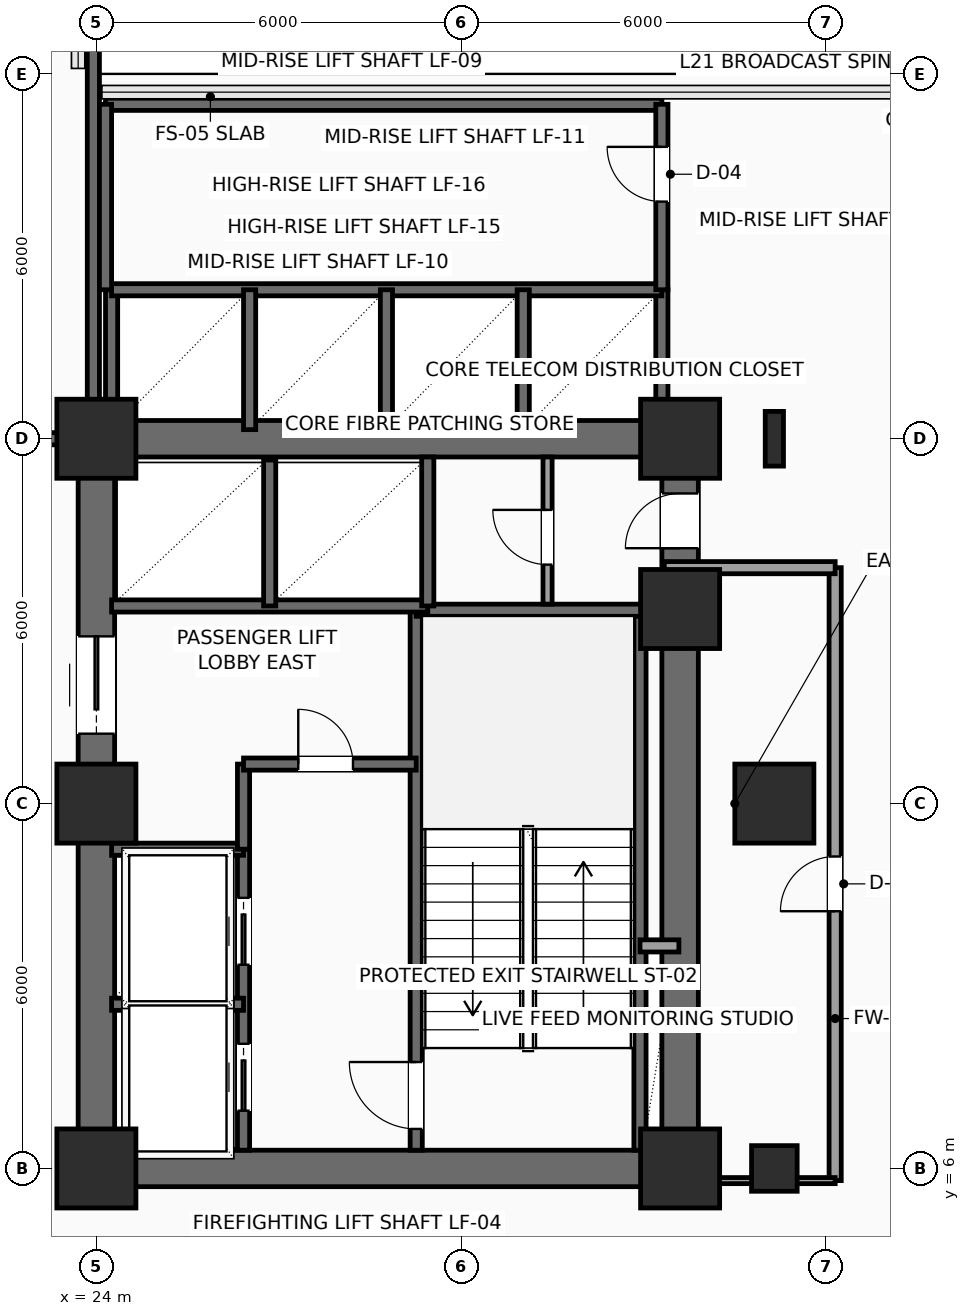
"""IFC4 building model, lengths in metres.
Left out: names, types, materials, properties, quantities, classifications, styles, units other than length and angle.
Written with IfcOpenShell. Run it as: python <this file> out.ifc"""

import sys

from ifc_helpers import new_model, si_unit, direction, frame, frame_2d, origin, origin_2d, place, context, subcontext, project, spatial, rectangle, hollow_rectangle, i_section, extrude, element, fill, save


model = new_model("IFC4")
c1 = context("Model", 3, precision=1e-05, world=origin(), true_north=direction((0.0, 1.0)))
c2 = subcontext(c1, "Body", "Model", "MODEL_VIEW")
j1 = project(units=[si_unit("LENGTHUNIT", "METRE"), si_unit("PLANEANGLEUNIT", "RADIAN")], contexts=[c1])
p1 = place(None, origin())
s1 = spatial("IfcSite", under=j1, at=p1, CompositionType="ELEMENT")
p2 = place(p1, origin())
s2 = spatial("IfcBuilding", under=s1, at=p2, CompositionType="ELEMENT")
p3 = place(p2, frame((0.0, 0.0, 90.9)))
s3 = spatial("IfcBuildingStorey", under=s2, at=p3, CompositionType="ELEMENT", Elevation=90.9)
for number, where, z_axis, x_axis in (
    (1, (24.0, 6.0, 0.0), (0.0, 0.0, 1.0), (1.0, 0.0, 0.0)),
    (2, (24.0, 12.0, 0.0), (0.0, 0.0, 1.0), (1.0, 0.0, 0.0)),
    (3, (24.0, 18.0, 0.0), (0.0, 0.0, 1.0), (1.0, 0.0, 0.0)),
    (4, (33.6, 6.0, 0.0), (0.0, 0.0, 1.0), (1.0, 0.0, 0.0)),
    (5, (33.6, 15.2, 0.0), (0.0, 0.0, 1.0), (1.0, 0.0, 0.0)),
    (6, (33.6, 18.0, 0.0), (0.0, 0.0, 1.0), (1.0, 0.0, 0.0)),
):
    element("IfcColumn", number, at=place(p3, frame(where, z_axis=z_axis, x_axis=x_axis)), inside=s3, PredefinedType="COLUMN", context=c2, shape_type="SweptSolid", body=[
        extrude(rectangle(XDim=1.3, YDim=1.3, at=origin_2d()), origin(), (0.0, 0.0, 1.0), 3.9),
    ])
p4 = place(p3, frame((35.15, 6.0, 0.0), z_axis=(0.0, 0.0, 1.0), x_axis=(1.0, 0.0, 0.0)))
e7 = element("IfcColumn", 7, at=p4, inside=s3, PredefinedType="COLUMN", context=c2, shape_type="SweptSolid", body=[
    extrude(hollow_rectangle(XDim=0.75, YDim=0.75, WallThickness=0.035, InnerFilletRadius=0.035, OuterFilletRadius=0.05, at=origin_2d()), origin(), (0.0, 0.0, 1.0), 3.9),
])
p5 = place(p3, frame((35.15, 12.0, 0.0), z_axis=(0.0, 0.0, 1.0), x_axis=(1.0, 0.0, 0.0)))
e8 = element("IfcColumn", 8, at=p5, inside=s3, PredefinedType="COLUMN", context=c2, shape_type="SweptSolid", body=[
    extrude(rectangle(XDim=1.3, YDim=1.3, at=origin_2d()), origin(), (0.0, 0.0, 1.0), 3.9),
])
p6 = place(p3, frame((35.15, 18.0, 0.0), z_axis=(0.0, 0.0, 1.0), x_axis=(1.0, 0.0, 0.0)))
e9 = element("IfcColumn", 9, at=p6, inside=s3, PredefinedType="COLUMN", context=c2, shape_type="SweptSolid", body=[
    extrude(i_section(OverallWidth=0.3, OverallDepth=0.9, WebThickness=0.019, FlangeThickness=0.035, FilletRadius=0.03, at=origin_2d()), origin(), (0.0, 0.0, 1.0), 3.9),
])
for number, where, z_axis, x_axis in (
    (10, (24.0, 6.0, 0.0), (0.0, 0.0, 1.0), (1.0, 0.0, 0.0)),
    (11, (24.0, 18.0, 0.0), (0.0, 0.0, 1.0), (1.0, 0.0, 0.0)),
):
    element("IfcWall", number, at=place(p3, frame(where, z_axis=z_axis, x_axis=x_axis)), inside=s3, PredefinedType="SHEAR", context=c2, shape_type="SweptSolid", body=[
        extrude(rectangle(XDim=9.6, YDim=0.6, at=frame_2d((4.8, 0.0))), origin(), (0.0, 0.0, 1.0), 3.575),
    ])
p7 = place(p3, frame((24.0, 6.0, 0.0), z_axis=(0.0, 0.0, 1.0), x_axis=(0.0, 1.0, 0.0)))
e12 = element("IfcWall", 12, at=p7, inside=s3, PredefinedType="SHEAR", context=c2, shape_type="SweptSolid", body=[
    extrude(rectangle(XDim=12.0, YDim=0.6, at=frame_2d((6.0, 0.0))), origin(), (0.0, 0.0, 1.0), 3.575),
])
p8 = place(p7, frame((7.15, 0.0, 0.0)))
e13 = element("IfcOpeningElement", 13, at=p8, cuts=e12, PredefinedType="OPENING", context=c2, shape_type="SweptSolid", body=[
    extrude(rectangle(XDim=1.6, YDim=2.3, at=frame_2d((0.8, 1.15))), frame((0.0, 0.31, 0.0), z_axis=(0.0, -1.0, 0.0), x_axis=(1.0, 0.0, 0.0)), (0.0, 0.0, 1.0), 0.62),
])
p9 = place(p3, frame((33.6, 6.0, 0.0), z_axis=(0.0, 0.0, 1.0), x_axis=(0.0, 1.0, 0.0)))
e14 = element("IfcWall", 14, at=p9, inside=s3, PredefinedType="SHEAR", context=c2, shape_type="SweptSolid", body=[
    extrude(rectangle(XDim=12.0, YDim=0.6, at=frame_2d((6.0, 0.0))), origin(), (0.0, 0.0, 1.0), 3.575),
])
p10 = place(p9, frame((10.2, 0.0, 0.0)))
e15 = element("IfcOpeningElement", 15, at=p10, cuts=e14, PredefinedType="OPENING", context=c2, shape_type="SweptSolid", body=[
    extrude(rectangle(XDim=0.9, YDim=2.15, at=frame_2d((0.45, 1.075))), frame((0.0, 0.31, 0.0), z_axis=(0.0, -1.0, 0.0), x_axis=(1.0, 0.0, 0.0)), (0.0, 0.0, 1.0), 0.62),
])
p11 = place(p3, frame((29.26, 6.3, 0.0), z_axis=(0.0, 0.0, 1.0), x_axis=(0.0, 1.0, 0.0)))
e16 = element("IfcWall", 16, at=p11, inside=s3, PredefinedType="SHEAR", context=c2, shape_type="SweptSolid", body=[
    extrude(rectangle(XDim=8.88, YDim=0.2, at=frame_2d((4.44, 0.0))), origin(), (0.0, 0.0, 1.0), 3.575),
])
p12 = place(p11, frame((0.35, 0.0, 0.0)))
e17 = element("IfcOpeningElement", 17, at=p12, cuts=e16, PredefinedType="OPENING", context=c2, shape_type="SweptSolid", body=[
    extrude(rectangle(XDim=1.1, YDim=2.2, at=frame_2d((0.55, 1.1))), frame((0.0, 0.11, 0.0), z_axis=(0.0, -1.0, 0.0), x_axis=(1.0, 0.0, 0.0)), (0.0, 0.0, 1.0), 0.22),
])
p13 = place(p3, frame((32.94, 6.3, 0.0), z_axis=(0.0, 0.0, 1.0), x_axis=(0.0, 1.0, 0.0)))
e18 = element("IfcWall", 18, at=p13, inside=s3, PredefinedType="SHEAR", context=c2, shape_type="SweptSolid", body=[
    extrude(rectangle(XDim=8.88, YDim=0.2, at=frame_2d((4.44, 0.0))), origin(), (0.0, 0.0, 1.0), 3.575),
])
p14 = place(p3, frame((29.26, 15.18, 0.0), z_axis=(0.0, 0.0, 1.0), x_axis=(1.0, 0.0, 0.0)))
e19 = element("IfcWall", 19, at=p14, inside=s3, PredefinedType="SHEAR", context=c2, shape_type="SweptSolid", body=[
    extrude(rectangle(XDim=4.04, YDim=0.2, at=frame_2d((2.02, 0.0))), origin(), (0.0, 0.0, 1.0), 3.575),
])
p15 = place(p3, frame((26.42, 6.3, 0.0), z_axis=(0.0, 0.0, 1.0), x_axis=(0.0, 1.0, 0.0)))
e20 = element("IfcWall", 20, at=p15, inside=s3, PredefinedType="SHEAR", context=c2, shape_type="SweptSolid", body=[
    extrude(rectangle(XDim=4.95, YDim=0.2, at=frame_2d((2.475, 0.0))), origin(), (0.0, 0.0, 1.0), 3.575),
])
p16 = place(p15, frame((0.65, 0.0, 0.0)))
e21 = element("IfcOpeningElement", 21, at=p16, cuts=e20, PredefinedType="OPENING", context=c2, shape_type="SweptSolid", body=[
    extrude(rectangle(XDim=1.1, YDim=2.2, at=frame_2d((0.55, 1.1))), frame((0.0, 0.11, 0.0), z_axis=(0.0, -1.0, 0.0), x_axis=(1.0, 0.0, 0.0)), (0.0, 0.0, 1.0), 0.22),
])
p17 = place(p15, frame((3.05, 0.0, 0.0)))
e22 = element("IfcOpeningElement", 22, at=p17, cuts=e20, PredefinedType="OPENING", context=c2, shape_type="SweptSolid", body=[
    extrude(rectangle(XDim=1.1, YDim=2.2, at=frame_2d((0.55, 1.1))), frame((0.0, 0.11, 0.0), z_axis=(0.0, -1.0, 0.0), x_axis=(1.0, 0.0, 0.0)), (0.0, 0.0, 1.0), 0.22),
])
for number, where, z_axis, x_axis in (
    (23, (24.25, 8.7, 0.0), (0.0, 0.0, 1.0), (1.0, 0.0, 0.0)),
    (24, (24.25, 11.25, 0.0), (0.0, 0.0, 1.0), (1.0, 0.0, 0.0)),
):
    element("IfcWall", number, at=place(p3, frame(where, z_axis=z_axis, x_axis=x_axis)), inside=s3, PredefinedType="SHEAR", context=c2, shape_type="SweptSolid", body=[
        extrude(rectangle(XDim=2.17, YDim=0.2, at=frame_2d((1.085, 0.0))), origin(), (0.0, 0.0, 1.0), 3.575),
    ])
p18 = place(p3, frame((26.42, 11.25, 0.0), z_axis=(0.0, 0.0, 1.0), x_axis=(0.0, 1.0, 0.0)))
e25 = element("IfcWall", 25, at=p18, inside=s3, PredefinedType="SHEAR", context=c2, shape_type="SweptSolid", body=[
    extrude(rectangle(XDim=1.4, YDim=0.2, at=frame_2d((0.7, 0.0))), origin(), (0.0, 0.0, 1.0), 3.575),
])
p19 = place(p3, frame((26.42, 12.65, 0.0), z_axis=(0.0, 0.0, 1.0), x_axis=(1.0, 0.0, 0.0)))
e26 = element("IfcWall", 26, at=p19, inside=s3, PredefinedType="SHEAR", context=c2, shape_type="SweptSolid", body=[
    extrude(rectangle(XDim=2.84, YDim=0.2, at=frame_2d((1.42, 0.0))), origin(), (0.0, 0.0, 1.0), 3.575),
])
p20 = place(p19, frame((0.9, 0.0, 0.0)))
e27 = element("IfcOpeningElement", 27, at=p20, cuts=e26, PredefinedType="OPENING", context=c2, shape_type="SweptSolid", body=[
    extrude(rectangle(XDim=0.9, YDim=2.15, at=frame_2d((0.45, 1.075))), frame((0.0, 0.11, 0.0), z_axis=(0.0, -1.0, 0.0), x_axis=(1.0, 0.0, 0.0)), (0.0, 0.0, 1.0), 0.22),
])
p21 = place(p3, frame((32.94, 9.66, 0.0), z_axis=(0.0, 0.0, 1.0), x_axis=(1.0, 0.0, 0.0)))
e28 = element("IfcWall", 28, at=p21, inside=s3, PredefinedType="SOLIDWALL", context=c2, shape_type="SweptSolid", body=[
    extrude(rectangle(XDim=0.64, YDim=0.2, at=frame_2d((0.32, 0.0))), origin(), (0.0, 0.0, 1.0), 3.575),
])
p22 = place(p3, frame((24.25, 15.25, 0.0), z_axis=(0.0, 0.0, 1.0), x_axis=(1.0, 0.0, 0.0)))
e29 = element("IfcWall", 29, at=p22, inside=s3, PredefinedType="SHEAR", context=c2, shape_type="SweptSolid", body=[
    extrude(rectangle(XDim=5.2, YDim=0.2, at=frame_2d((2.6, 0.0))), origin(), (0.0, 0.0, 1.0), 3.575),
])
p23 = place(p3, frame((26.85, 15.25, 0.0), z_axis=(0.0, 0.0, 1.0), x_axis=(0.0, 1.0, 0.0)))
e30 = element("IfcWall", 30, at=p23, inside=s3, PredefinedType="SHEAR", context=c2, shape_type="SweptSolid", body=[
    extrude(rectangle(XDim=2.4, YDim=0.2, at=frame_2d((1.2, 0.0))), origin(), (0.0, 0.0, 1.0), 3.575),
])
p24 = place(p3, frame((29.45, 15.25, 0.0), z_axis=(0.0, 0.0, 1.0), x_axis=(0.0, 1.0, 0.0)))
e31 = element("IfcWall", 31, at=p24, inside=s3, PredefinedType="SHEAR", context=c2, shape_type="SweptSolid", body=[
    extrude(rectangle(XDim=2.45, YDim=0.2, at=frame_2d((1.225, 0.0))), origin(), (0.0, 0.0, 1.0), 3.575),
])
p25 = place(p3, frame((31.42, 15.28, 0.0), z_axis=(0.0, 0.0, 1.0), x_axis=(0.0, 1.0, 0.0)))
e32 = element("IfcWall", 32, at=p25, inside=s3, PredefinedType="PARTITIONING", context=c2, shape_type="SweptSolid", body=[
    extrude(rectangle(XDim=2.42, YDim=0.15, at=frame_2d((1.21, 0.0))), origin(), (0.0, 0.0, 1.0), 3.575),
])
p26 = place(p25, frame((0.65, 0.0, 0.0)))
e33 = element("IfcOpeningElement", 33, at=p26, cuts=e32, PredefinedType="OPENING", context=c2, shape_type="SweptSolid", body=[
    extrude(rectangle(XDim=0.9, YDim=2.15, at=frame_2d((0.45, 1.075))), frame((0.0, 0.085, 0.0), z_axis=(0.0, -1.0, 0.0), x_axis=(1.0, 0.0, 0.0)), (0.0, 0.0, 1.0), 0.17),
])
p27 = place(p3, frame((20.45, 18.0, 0.0), z_axis=(0.0, 0.0, 1.0), x_axis=(1.0, 0.0, 0.0)))
e34 = element("IfcWall", 34, at=p27, inside=s3, PredefinedType="SHEAR", context=c2, shape_type="SweptSolid", body=[
    extrude(rectangle(XDim=3.5, YDim=0.2, at=frame_2d((1.75, 0.0))), origin(), (0.0, 0.0, 1.0), 3.575),
])
p28 = place(p27, frame((0.95, 0.0, 0.0)))
e35 = element("IfcOpeningElement", 35, at=p28, cuts=e34, PredefinedType="OPENING", context=c2, shape_type="SweptSolid", body=[
    extrude(rectangle(XDim=1.6, YDim=2.3, at=frame_2d((0.8, 1.15))), frame((0.0, 0.11, 0.0), z_axis=(0.0, -1.0, 0.0), x_axis=(1.0, 0.0, 0.0)), (0.0, 0.0, 1.0), 0.22),
])
p29 = place(p3, frame((23.95, 18.0, 0.0), z_axis=(0.0, 0.0, 1.0), x_axis=(0.0, 1.0, 0.0)))
e36 = element("IfcWall", 36, at=p29, inside=s3, PredefinedType="SHEAR", context=c2, shape_type="SweptSolid", body=[
    extrude(rectangle(XDim=9.3, YDim=0.2, at=frame_2d((4.65, 0.0))), origin(), (0.0, 0.0, 1.0), 3.575),
])
for number, where, z_axis, x_axis in (
    (37, (33.3, 18.1, 0.0), (0.0, 0.0, 1.0), (0.0, 1.0, 0.0)),
    (38, (24.25, 18.1, 0.0), (0.0, 0.0, 1.0), (0.0, 1.0, 0.0)),
):
    element("IfcWall", number, at=place(p3, frame(where, z_axis=z_axis, x_axis=x_axis)), inside=s3, PredefinedType="SHEAR", context=c2, shape_type="SweptSolid", body=[
        extrude(rectangle(XDim=2.35, YDim=0.2, at=frame_2d((1.175, 0.0))), origin(), (0.0, 0.0, 1.0), 3.575),
    ])
p30 = place(p3, frame((24.25, 20.45, 0.0), z_axis=(0.0, 0.0, 1.0), x_axis=(1.0, 0.0, 0.0)))
e39 = element("IfcWall", 39, at=p30, inside=s3, PredefinedType="SHEAR", context=c2, shape_type="SweptSolid", body=[
    extrude(rectangle(XDim=9.05, YDim=0.2, at=frame_2d((4.525, 0.0))), origin(), (0.0, 0.0, 1.0), 3.575),
])
for number, where, z_axis, x_axis in (
    (40, (26.52, 18.15, 0.0), (0.0, 0.0, 1.0), (0.0, 1.0, 0.0)),
    (41, (28.77, 18.15, 0.0), (0.0, 0.0, 1.0), (0.0, 1.0, 0.0)),
    (42, (31.02, 18.15, 0.0), (0.0, 0.0, 1.0), (0.0, 1.0, 0.0)),
):
    element("IfcWall", number, at=place(p3, frame(where, z_axis=z_axis, x_axis=x_axis)), inside=s3, PredefinedType="SHEAR", context=c2, shape_type="SweptSolid", body=[
        extrude(rectangle(XDim=2.3, YDim=0.2, at=frame_2d((1.15, 0.0))), origin(), (0.0, 0.0, 1.0), 3.575),
    ])
p31 = place(p3, frame((24.15, 23.5, 0.0), z_axis=(0.0, 0.0, 1.0), x_axis=(1.0, 0.0, 0.0)))
e43 = element("IfcWall", 43, at=p31, inside=s3, PredefinedType="SHEAR", context=c2, shape_type="SweptSolid", body=[
    extrude(rectangle(XDim=9.15, YDim=0.2, at=frame_2d((4.575, 0.0))), origin(), (0.0, 0.0, 1.0), 3.575),
])
p32 = place(p3, frame((33.3, 20.45, 0.0), z_axis=(0.0, 0.0, 1.0), x_axis=(0.0, 1.0, 0.0)))
e44 = element("IfcWall", 44, at=p32, inside=s3, PredefinedType="SHEAR", context=c2, shape_type="SweptSolid", body=[
    extrude(rectangle(XDim=3.05, YDim=0.2, at=frame_2d((1.525, 0.0))), origin(), (0.0, 0.0, 1.0), 3.575),
])
p33 = place(p32, frame((1.45, 0.0, 0.0)))
e45 = element("IfcOpeningElement", 45, at=p33, cuts=e44, PredefinedType="OPENING", context=c2, shape_type="SweptSolid", body=[
    extrude(rectangle(XDim=0.9, YDim=2.15, at=frame_2d((0.45, 1.075))), frame((0.0, 0.11, 0.0), z_axis=(0.0, -1.0, 0.0), x_axis=(1.0, 0.0, 0.0)), (0.0, 0.0, 1.0), 0.22),
])
p34 = place(p3, frame((24.15, 20.45, 0.0), z_axis=(0.0, 0.0, 1.0), x_axis=(0.0, 1.0, 0.0)))
e46 = element("IfcWall", 46, at=p34, inside=s3, PredefinedType="SHEAR", context=c2, shape_type="SweptSolid", body=[
    extrude(rectangle(XDim=3.05, YDim=0.2, at=frame_2d((1.525, 0.0))), origin(), (0.0, 0.0, 1.0), 3.575),
])
p35 = place(p3, frame((36.15, 5.8, 0.0), z_axis=(0.0, 0.0, 1.0), x_axis=(0.0, 1.0, 0.0)))
e47 = element("IfcWall", 47, at=p35, inside=s3, PredefinedType="SOLIDWALL", context=c2, shape_type="SweptSolid", body=[
    extrude(rectangle(XDim=10.08, YDim=0.2, at=frame_2d((5.04, 0.0))), origin(), (0.0, 0.0, 1.0), 3.575),
])
p36 = place(p35, frame((4.43, 0.0, 0.0)))
e48 = element("IfcOpeningElement", 48, at=p36, cuts=e47, PredefinedType="OPENING", context=c2, shape_type="SweptSolid", body=[
    extrude(rectangle(XDim=0.9, YDim=2.1, at=frame_2d((0.45, 1.05))), frame((0.0, 0.11, 0.0), z_axis=(0.0, -1.0, 0.0), x_axis=(1.0, 0.0, 0.0)), (0.0, 0.0, 1.0), 0.22),
])
p37 = place(p3, frame((36.15, 15.88, 0.0), z_axis=(0.0, 0.0, 1.0), x_axis=(-1.0, 0.0, 0.0)))
e49 = element("IfcWall", 49, at=p37, inside=s3, PredefinedType="SOLIDWALL", context=c2, shape_type="SweptSolid", body=[
    extrude(rectangle(XDim=2.81, YDim=0.2, at=frame_2d((1.405, 0.0))), origin(), (0.0, 0.0, 1.0), 3.575),
])
p38 = place(p3, frame((33.65, 5.8, 0.0), z_axis=(0.0, 0.0, 1.0), x_axis=(1.0, 0.0, 0.0)))
e50 = element("IfcWall", 50, at=p38, inside=s3, PredefinedType="PARTITIONING", context=c2, shape_type="SweptSolid", body=[
    extrude(rectangle(XDim=2.5, YDim=0.1, at=frame_2d((1.25, 0.0))), origin(), (0.0, 0.0, 1.0), 2.917),
])
p39 = place(p8, origin())
e51 = element("IfcDoor", 51, at=p39, inside=s3, OperationType="DOUBLE_DOOR_SLIDING", PredefinedType="DOOR", context=c2, shape_type="SweptSolid", body=[
    extrude(rectangle(XDim=1.6, YDim=2.3, at=frame_2d((0.8, 1.15))), frame((0.0, 0.025, 0.0), z_axis=(0.0, -1.0, 0.0), x_axis=(1.0, 0.0, 0.0)), (0.0, 0.0, 1.0), 0.05),
])
fill(e13, e51)
p40 = place(p10, origin())
e52 = element("IfcDoor", 52, at=p40, inside=s3, OperationType="SINGLE_SWING_LEFT", PredefinedType="DOOR", context=c2, shape_type="SweptSolid", body=[
    extrude(rectangle(XDim=0.9, YDim=2.15, at=frame_2d((0.45, 1.075))), frame((0.0, 0.025, 0.0), z_axis=(0.0, -1.0, 0.0), x_axis=(1.0, 0.0, 0.0)), (0.0, 0.0, 1.0), 0.05),
])
fill(e15, e52)
p41 = place(p12, origin())
e53 = element("IfcDoor", 53, at=p41, inside=s3, OperationType="SINGLE_SWING_RIGHT", PredefinedType="DOOR", context=c2, shape_type="SweptSolid", body=[
    extrude(rectangle(XDim=1.1, YDim=2.2, at=frame_2d((0.55, 1.1))), frame((0.0, 0.025, 0.0), z_axis=(0.0, -1.0, 0.0), x_axis=(1.0, 0.0, 0.0)), (0.0, 0.0, 1.0), 0.05),
])
fill(e17, e53)
p42 = place(p16, origin())
e54 = element("IfcDoor", 54, at=p42, inside=s3, OperationType="SLIDING_TO_LEFT", PredefinedType="DOOR", context=c2, shape_type="SweptSolid", body=[
    extrude(rectangle(XDim=1.1, YDim=2.2, at=frame_2d((0.55, 1.1))), frame((0.0, 0.025, 0.0), z_axis=(0.0, -1.0, 0.0), x_axis=(1.0, 0.0, 0.0)), (0.0, 0.0, 1.0), 0.05),
])
fill(e21, e54)
p43 = place(p17, origin())
e55 = element("IfcDoor", 55, at=p43, inside=s3, OperationType="SLIDING_TO_LEFT", PredefinedType="DOOR", context=c2, shape_type="SweptSolid", body=[
    extrude(rectangle(XDim=1.1, YDim=2.2, at=frame_2d((0.55, 1.1))), frame((0.0, 0.025, 0.0), z_axis=(0.0, -1.0, 0.0), x_axis=(1.0, 0.0, 0.0)), (0.0, 0.0, 1.0), 0.05),
])
fill(e22, e55)
p44 = place(p20, origin())
e56 = element("IfcDoor", 56, at=p44, inside=s3, OperationType="SINGLE_SWING_LEFT", PredefinedType="DOOR", context=c2, shape_type="SweptSolid", body=[
    extrude(rectangle(XDim=0.9, YDim=2.15, at=frame_2d((0.45, 1.075))), frame((0.0, 0.025, 0.0), z_axis=(0.0, -1.0, 0.0), x_axis=(1.0, 0.0, 0.0)), (0.0, 0.0, 1.0), 0.05),
])
fill(e27, e56)
p45 = place(p26, origin())
e57 = element("IfcDoor", 57, at=p45, inside=s3, OperationType="SINGLE_SWING_RIGHT", PredefinedType="DOOR", context=c2, shape_type="SweptSolid", body=[
    extrude(rectangle(XDim=0.9, YDim=2.15, at=frame_2d((0.45, 1.075))), frame((0.0, 0.025, 0.0), z_axis=(0.0, -1.0, 0.0), x_axis=(1.0, 0.0, 0.0)), (0.0, 0.0, 1.0), 0.05),
])
fill(e33, e57)
p46 = place(p33, origin())
e58 = element("IfcDoor", 58, at=p46, inside=s3, OperationType="SINGLE_SWING_RIGHT", PredefinedType="DOOR", context=c2, shape_type="SweptSolid", body=[
    extrude(rectangle(XDim=0.9, YDim=2.15, at=frame_2d((0.45, 1.075))), frame((0.0, 0.025, 0.0), z_axis=(0.0, -1.0, 0.0), x_axis=(1.0, 0.0, 0.0)), (0.0, 0.0, 1.0), 0.05),
])
fill(e45, e58)
p47 = place(p36, origin())
e59 = element("IfcDoor", 59, at=p47, inside=s3, OperationType="SINGLE_SWING_LEFT", PredefinedType="DOOR", context=c2, shape_type="SweptSolid", body=[
    extrude(rectangle(XDim=0.9, YDim=2.1, at=frame_2d((0.45, 1.05))), frame((0.0, 0.025, 0.0), z_axis=(0.0, -1.0, 0.0), x_axis=(1.0, 0.0, 0.0)), (0.0, 0.0, 1.0), 0.05),
])
fill(e48, e59)
save(model, sys.argv[1])
